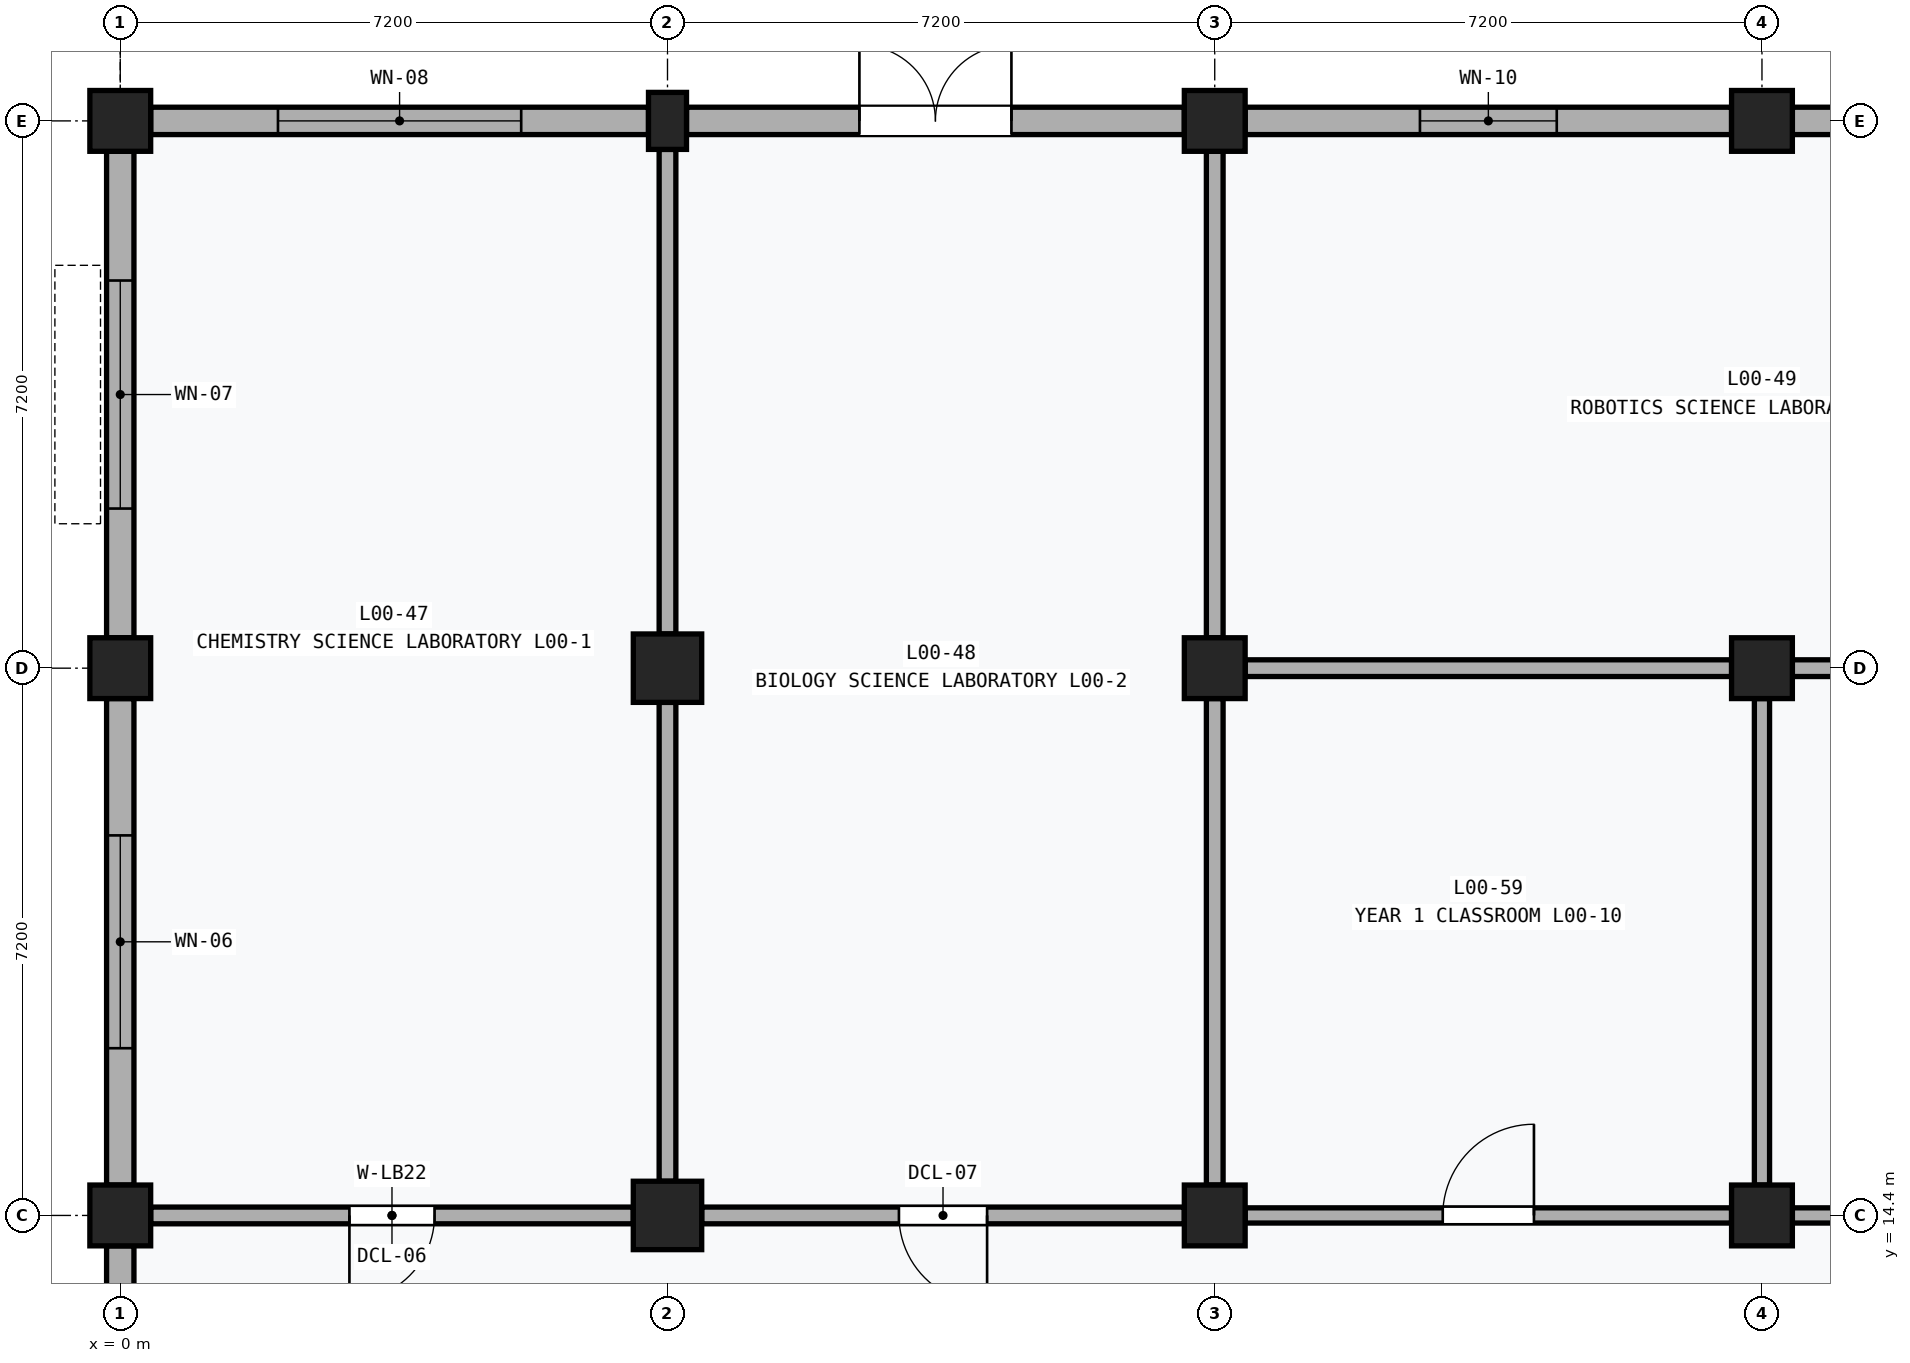
"""IFC4 building model, lengths in metres.
Left out: names, types, materials, properties, quantities, classifications, styles, units other than length and angle.
Written with IfcOpenShell. Run it as: python <this file> out.ifc"""

import sys

from ifc_helpers import new_model, si_unit, direction, frame, frame_2d, origin, origin_2d, place, context, subcontext, project, spatial, rectangle, extrude, element, fill, save


model = new_model("IFC4")
c1 = context("Model", 3, precision=1e-05, world=origin(), true_north=direction((0.0, 1.0)))
c2 = subcontext(c1, "Body", "Model", "MODEL_VIEW")
j1 = project(units=[si_unit("LENGTHUNIT", "METRE"), si_unit("PLANEANGLEUNIT", "RADIAN")], contexts=[c1])
p1 = place(None, origin())
s1 = spatial("IfcSite", under=j1, at=p1, CompositionType="ELEMENT")
p2 = place(p1, origin())
s2 = spatial("IfcBuilding", under=s1, at=p2, CompositionType="ELEMENT")
p3 = place(p2, origin())
s3 = spatial("IfcBuildingStorey", under=s2, at=p3, CompositionType="ELEMENT", Elevation=0.0)
for number, where, z_axis, x_axis in (
    (1, (0.0, 14.4, 0.0), (0.0, 0.0, 1.0), (1.0, 0.0, 0.0)),
    (2, (0.0, 21.6, 0.0), (0.0, 0.0, 1.0), (1.0, 0.0, 0.0)),
    (3, (0.0, 28.8, 0.0), (0.0, 0.0, 1.0), (1.0, 0.0, 0.0)),
):
    element("IfcColumn", number, at=place(p3, frame(where, z_axis=z_axis, x_axis=x_axis)), inside=s3, PredefinedType="COLUMN", context=c2, shape_type="SweptSolid", body=[
        extrude(rectangle(XDim=0.8, YDim=0.8, at=origin_2d()), origin(), (0.0, 0.0, 1.0), 4.8),
    ])
for number, where, z_axis, x_axis in (
    (4, (7.2, 14.4, 0.0), (0.0, 0.0, 1.0), (1.0, 0.0, 0.0)),
    (5, (7.2, 21.6, 0.0), (0.0, 0.0, 1.0), (1.0, 0.0, 0.0)),
):
    element("IfcColumn", number, at=place(p3, frame(where, z_axis=z_axis, x_axis=x_axis)), inside=s3, PredefinedType="COLUMN", context=c2, shape_type="SweptSolid", body=[
        extrude(rectangle(XDim=0.9, YDim=0.9, at=origin_2d()), origin(), (0.0, 0.0, 1.0), 4.8),
    ])
p4 = place(p3, frame((7.2, 28.8, 0.0), z_axis=(0.0, 0.0, 1.0), x_axis=(1.0, 0.0, 0.0)))
e6 = element("IfcColumn", 6, at=p4, inside=s3, PredefinedType="PILASTER", context=c2, shape_type="SweptSolid", body=[
    extrude(rectangle(XDim=0.5, YDim=0.75, at=origin_2d()), origin(), (0.0, 0.0, 1.0), 4.8),
])
for number, where, z_axis, x_axis in (
    (7, (14.4, 14.4, 0.0), (0.0, 0.0, 1.0), (1.0, 0.0, 0.0)),
    (8, (14.4, 21.6, 0.0), (0.0, 0.0, 1.0), (1.0, 0.0, 0.0)),
    (9, (14.4, 28.8, 0.0), (0.0, 0.0, 1.0), (1.0, 0.0, 0.0)),
    (10, (21.6, 14.4, 0.0), (0.0, 0.0, 1.0), (1.0, 0.0, 0.0)),
    (11, (21.6, 21.6, 0.0), (0.0, 0.0, 1.0), (1.0, 0.0, 0.0)),
    (12, (21.6, 28.8, 0.0), (0.0, 0.0, 1.0), (1.0, 0.0, 0.0)),
):
    element("IfcColumn", number, at=place(p3, frame(where, z_axis=z_axis, x_axis=x_axis)), inside=s3, PredefinedType="COLUMN", context=c2, shape_type="SweptSolid", body=[
        extrude(rectangle(XDim=0.8, YDim=0.8, at=origin_2d()), origin(), (0.0, 0.0, 1.0), 4.8),
    ])
p5 = place(p3, frame((0.0, 7.6, 0.0), z_axis=(0.0, 0.0, 1.0), x_axis=(0.0, 1.0, 0.0)))
e13 = element("IfcWall", 13, at=p5, inside=s3, PredefinedType="SOLIDWALL", context=c2, shape_type="SweptSolid", body=[
    extrude(rectangle(XDim=6.4, YDim=0.36, at=frame_2d((3.2, 0.0))), origin(), (0.0, 0.0, 1.0), 3.89),
])
p6 = place(p5, frame((1.9, 0.0, 0.9)))
e14 = element("IfcOpeningElement", 14, at=p6, cuts=e13, PredefinedType="OPENING", context=c2, shape_type="SweptSolid", body=[
    extrude(rectangle(XDim=2.6, YDim=1.8, at=frame_2d((1.3, 0.9))), frame((0.0, 0.192, 0.0), z_axis=(0.0, -1.0, 0.0), x_axis=(1.0, 0.0, 0.0)), (0.0, 0.0, 1.0), 0.384),
])
p7 = place(p3, frame((0.0, 14.8, 0.0), z_axis=(0.0, 0.0, 1.0), x_axis=(0.0, 1.0, 0.0)))
e15 = element("IfcWall", 15, at=p7, inside=s3, PredefinedType="SOLIDWALL", context=c2, shape_type="SweptSolid", body=[
    extrude(rectangle(XDim=6.4, YDim=0.36, at=frame_2d((3.2, 0.0))), origin(), (0.0, 0.0, 1.0), 3.89),
])
p8 = place(p7, frame((1.8, 0.0, 0.9)))
e16 = element("IfcOpeningElement", 16, at=p8, cuts=e15, PredefinedType="OPENING", context=c2, shape_type="SweptSolid", body=[
    extrude(rectangle(XDim=2.8, YDim=1.8, at=frame_2d((1.4, 0.9))), frame((0.0, 0.192, 0.0), z_axis=(0.0, -1.0, 0.0), x_axis=(1.0, 0.0, 0.0)), (0.0, 0.0, 1.0), 0.384),
])
p9 = place(p3, frame((0.4, 28.8, 0.0), z_axis=(0.0, 0.0, 1.0), x_axis=(1.0, 0.0, 0.0)))
e17 = element("IfcWall", 17, at=p9, inside=s3, PredefinedType="SOLIDWALL", context=c2, shape_type="SweptSolid", body=[
    extrude(rectangle(XDim=6.55, YDim=0.36, at=frame_2d((3.275, 0.0))), origin(), (0.0, 0.0, 1.0), 3.89),
])
p10 = place(p9, frame((1.675, 0.0, 0.9)))
e18 = element("IfcOpeningElement", 18, at=p10, cuts=e17, PredefinedType="OPENING", context=c2, shape_type="SweptSolid", body=[
    extrude(rectangle(XDim=3.2, YDim=1.8, at=frame_2d((1.6, 0.9))), frame((0.0, 0.192, 0.0), z_axis=(0.0, -1.0, 0.0), x_axis=(1.0, 0.0, 0.0)), (0.0, 0.0, 1.0), 0.384),
])
p11 = place(p3, frame((0.0, 22.0, 0.0), z_axis=(0.0, 0.0, 1.0), x_axis=(0.0, 1.0, 0.0)))
e19 = element("IfcWall", 19, at=p11, inside=s3, PredefinedType="SOLIDWALL", context=c2, shape_type="SweptSolid", body=[
    extrude(rectangle(XDim=6.4, YDim=0.36, at=frame_2d((3.2, 0.0))), origin(), (0.0, 0.0, 1.0), 3.89),
])
p12 = place(p11, frame((1.7, 0.0, 0.9)))
e20 = element("IfcOpeningElement", 20, at=p12, cuts=e19, PredefinedType="OPENING", context=c2, shape_type="SweptSolid", body=[
    extrude(rectangle(XDim=3.0, YDim=1.8, at=frame_2d((1.5, 0.9))), frame((0.0, 0.192, 0.0), z_axis=(0.0, -1.0, 0.0), x_axis=(1.0, 0.0, 0.0)), (0.0, 0.0, 1.0), 0.384),
])
p13 = place(p3, frame((7.45, 28.8, 0.0), z_axis=(0.0, 0.0, 1.0), x_axis=(1.0, 0.0, 0.0)))
e21 = element("IfcWall", 21, at=p13, inside=s3, PredefinedType="SOLIDWALL", context=c2, shape_type="SweptSolid", body=[
    extrude(rectangle(XDim=6.55, YDim=0.36, at=frame_2d((3.275, 0.0))), origin(), (0.0, 0.0, 1.0), 3.89),
])
p14 = place(p13, frame((2.275, 0.0, 0.0)))
e22 = element("IfcOpeningElement", 22, at=p14, cuts=e21, PredefinedType="OPENING", context=c2, shape_type="SweptSolid", body=[
    extrude(rectangle(XDim=2.0, YDim=2.4, at=frame_2d((1.0, 1.2))), frame((0.0, 0.192, 0.0), z_axis=(0.0, -1.0, 0.0), x_axis=(1.0, 0.0, 0.0)), (0.0, 0.0, 1.0), 0.384),
])
p15 = place(p3, frame((14.8, 28.8, 0.0), z_axis=(0.0, 0.0, 1.0), x_axis=(1.0, 0.0, 0.0)))
e23 = element("IfcWall", 23, at=p15, inside=s3, PredefinedType="SOLIDWALL", context=c2, shape_type="SweptSolid", body=[
    extrude(rectangle(XDim=6.4, YDim=0.36, at=frame_2d((3.2, 0.0))), origin(), (0.0, 0.0, 1.0), 3.89),
])
p16 = place(p15, frame((2.3, 0.0, 0.85)))
e24 = element("IfcOpeningElement", 24, at=p16, cuts=e23, PredefinedType="OPENING", context=c2, shape_type="SweptSolid", body=[
    extrude(rectangle(XDim=1.8, YDim=2.0, at=frame_2d((0.9, 1.0))), frame((0.0, 0.192, 0.0), z_axis=(0.0, -1.0, 0.0), x_axis=(1.0, 0.0, 0.0)), (0.0, 0.0, 1.0), 0.384),
])
p17 = place(p3, frame((22.0, 28.8, 0.0), z_axis=(0.0, 0.0, 1.0), x_axis=(1.0, 0.0, 0.0)))
e25 = element("IfcWall", 25, at=p17, inside=s3, PredefinedType="SOLIDWALL", context=c2, shape_type="SweptSolid", body=[
    extrude(rectangle(XDim=6.4, YDim=0.36, at=frame_2d((3.2, 0.0))), origin(), (0.0, 0.0, 1.0), 3.89),
])
p18 = place(p17, frame((2.15, 0.0, 0.85)))
e26 = element("IfcOpeningElement", 26, at=p18, cuts=e25, PredefinedType="OPENING", context=c2, shape_type="SweptSolid", body=[
    extrude(rectangle(XDim=2.1, YDim=2.0, at=frame_2d((1.05, 1.0))), frame((0.0, 0.192, 0.0), z_axis=(0.0, -1.0, 0.0), x_axis=(1.0, 0.0, 0.0)), (0.0, 0.0, 1.0), 0.384),
])
p19 = place(p3, frame((0.4, 14.4, 0.0), z_axis=(0.0, 0.0, 1.0), x_axis=(1.0, 0.0, 0.0)))
e27 = element("IfcWall", 27, at=p19, inside=s3, PredefinedType="PARTITIONING", context=c2, shape_type="SweptSolid", body=[
    extrude(rectangle(XDim=6.35, YDim=0.22, at=frame_2d((3.175, 0.0))), origin(), (0.0, 0.0, 1.0), 3.62),
])
p20 = place(p19, frame((2.615, 0.0, 0.0)))
e28 = element("IfcOpeningElement", 28, at=p20, cuts=e27, PredefinedType="OPENING", context=c2, shape_type="SweptSolid", body=[
    extrude(rectangle(XDim=1.12, YDim=2.2, at=frame_2d((0.56, 1.1))), frame((0.0, 0.122, 0.0), z_axis=(0.0, -1.0, 0.0), x_axis=(1.0, 0.0, 0.0)), (0.0, 0.0, 1.0), 0.244),
])
p21 = place(p3, frame((7.2, 14.85, 0.0), z_axis=(0.0, 0.0, 1.0), x_axis=(0.0, 1.0, 0.0)))
e29 = element("IfcWall", 29, at=p21, inside=s3, PredefinedType="PARTITIONING", context=c2, shape_type="SweptSolid", body=[
    extrude(rectangle(XDim=6.3, YDim=0.22, at=frame_2d((3.15, 0.0))), origin(), (0.0, 0.0, 1.0), 3.62),
])
p22 = place(p3, frame((7.2, 22.05, 0.0), z_axis=(0.0, 0.0, 1.0), x_axis=(0.0, 1.0, 0.0)))
e30 = element("IfcWall", 30, at=p22, inside=s3, PredefinedType="PARTITIONING", context=c2, shape_type="SweptSolid", body=[
    extrude(rectangle(XDim=6.375, YDim=0.22, at=frame_2d((3.188, 0.0))), origin(), (0.0, 0.0, 1.0), 3.62),
])
p23 = place(p3, frame((7.65, 14.4, 0.0), z_axis=(0.0, 0.0, 1.0), x_axis=(1.0, 0.0, 0.0)))
e31 = element("IfcWall", 31, at=p23, inside=s3, PredefinedType="PARTITIONING", context=c2, shape_type="SweptSolid", body=[
    extrude(rectangle(XDim=6.35, YDim=0.22, at=frame_2d((3.175, 0.0))), origin(), (0.0, 0.0, 1.0), 3.62),
])
p24 = place(p23, frame((2.595, 0.0, 0.0)))
e32 = element("IfcOpeningElement", 32, at=p24, cuts=e31, PredefinedType="OPENING", context=c2, shape_type="SweptSolid", body=[
    extrude(rectangle(XDim=1.16, YDim=2.22, at=frame_2d((0.58, 1.11))), frame((0.0, 0.122, 0.0), z_axis=(0.0, -1.0, 0.0), x_axis=(1.0, 0.0, 0.0)), (0.0, 0.0, 1.0), 0.244),
])
for number, where, z_axis, x_axis in (
    (33, (14.4, 14.8, 0.0), (0.0, 0.0, 1.0), (0.0, 1.0, 0.0)),
    (34, (14.4, 22.0, 0.0), (0.0, 0.0, 1.0), (0.0, 1.0, 0.0)),
    (35, (14.8, 21.6, 0.0), (0.0, 0.0, 1.0), (1.0, 0.0, 0.0)),
    (36, (22.0, 21.6, 0.0), (0.0, 0.0, 1.0), (1.0, 0.0, 0.0)),
):
    element("IfcWall", number, at=place(p3, frame(where, z_axis=z_axis, x_axis=x_axis)), inside=s3, PredefinedType="PARTITIONING", context=c2, shape_type="SweptSolid", body=[
        extrude(rectangle(XDim=6.4, YDim=0.22, at=frame_2d((3.2, 0.0))), origin(), (0.0, 0.0, 1.0), 3.62),
    ])
p25 = place(p3, frame((14.8, 14.4, 0.0), z_axis=(0.0, 0.0, 1.0), x_axis=(1.0, 0.0, 0.0)))
e37 = element("IfcWall", 37, at=p25, inside=s3, PredefinedType="PARTITIONING", context=c2, shape_type="SweptSolid", body=[
    extrude(rectangle(XDim=6.4, YDim=0.2, at=frame_2d((3.2, 0.0))), origin(), (0.0, 0.0, 1.0), 3.62),
])
p26 = place(p25, frame((2.6, 0.0, 0.0)))
e38 = element("IfcOpeningElement", 38, at=p26, cuts=e37, PredefinedType="OPENING", context=c2, shape_type="SweptSolid", body=[
    extrude(rectangle(XDim=1.2, YDim=2.24, at=frame_2d((0.6, 1.12))), frame((0.0, 0.112, 0.0), z_axis=(0.0, -1.0, 0.0), x_axis=(1.0, 0.0, 0.0)), (0.0, 0.0, 1.0), 0.224),
])
p27 = place(p3, frame((21.6, 14.8, 0.0), z_axis=(0.0, 0.0, 1.0), x_axis=(0.0, 1.0, 0.0)))
e39 = element("IfcWall", 39, at=p27, inside=s3, PredefinedType="PARTITIONING", context=c2, shape_type="SweptSolid", body=[
    extrude(rectangle(XDim=6.4, YDim=0.2, at=frame_2d((3.2, 0.0))), origin(), (0.0, 0.0, 1.0), 3.62),
])
p28 = place(p3, frame((22.0, 14.4, 0.0), z_axis=(0.0, 0.0, 1.0), x_axis=(1.0, 0.0, 0.0)))
e40 = element("IfcWall", 40, at=p28, inside=s3, PredefinedType="PARTITIONING", context=c2, shape_type="SweptSolid", body=[
    extrude(rectangle(XDim=6.4, YDim=0.2, at=frame_2d((3.2, 0.0))), origin(), (0.0, 0.0, 1.0), 3.62),
])
p29 = place(p28, frame((2.58, 0.0, 0.0)))
e41 = element("IfcOpeningElement", 41, at=p29, cuts=e40, PredefinedType="OPENING", context=c2, shape_type="SweptSolid", body=[
    extrude(rectangle(XDim=1.24, YDim=2.26, at=frame_2d((0.62, 1.13))), frame((0.0, 0.112, 0.0), z_axis=(0.0, -1.0, 0.0), x_axis=(1.0, 0.0, 0.0)), (0.0, 0.0, 1.0), 0.224),
])
p30 = place(p8, origin())
e42 = element("IfcWindow", 42, at=p30, inside=s3, PartitioningType="SINGLE_PANEL", PredefinedType="WINDOW", context=c2, shape_type="SweptSolid", body=[
    extrude(rectangle(XDim=2.8, YDim=1.8, at=frame_2d((1.4, 0.9))), frame((0.0, 0.03, 0.0), z_axis=(0.0, -1.0, 0.0), x_axis=(1.0, 0.0, 0.0)), (0.0, 0.0, 1.0), 0.06),
])
fill(e16, e42)
p31 = place(p10, origin())
e43 = element("IfcWindow", 43, at=p31, inside=s3, PartitioningType="SINGLE_PANEL", PredefinedType="WINDOW", context=c2, shape_type="SweptSolid", body=[
    extrude(rectangle(XDim=3.2, YDim=1.8, at=frame_2d((1.6, 0.9))), frame((0.0, 0.03, 0.0), z_axis=(0.0, -1.0, 0.0), x_axis=(1.0, 0.0, 0.0)), (0.0, 0.0, 1.0), 0.06),
])
fill(e18, e43)
p32 = place(p12, origin())
e44 = element("IfcWindow", 44, at=p32, inside=s3, PartitioningType="SINGLE_PANEL", PredefinedType="WINDOW", context=c2, shape_type="SweptSolid", body=[
    extrude(rectangle(XDim=3.0, YDim=1.8, at=frame_2d((1.5, 0.9))), frame((0.0, 0.03, 0.0), z_axis=(0.0, -1.0, 0.0), x_axis=(1.0, 0.0, 0.0)), (0.0, 0.0, 1.0), 0.06),
])
fill(e20, e44)
p33 = place(p14, origin())
e45 = element("IfcDoor", 45, at=p33, inside=s3, OperationType="DOUBLE_DOOR_SINGLE_SWING", PredefinedType="DOOR", context=c2, shape_type="SweptSolid", body=[
    extrude(rectangle(XDim=2.0, YDim=2.4, at=frame_2d((1.0, 1.2))), frame((0.0, 0.025, 0.0), z_axis=(0.0, -1.0, 0.0), x_axis=(1.0, 0.0, 0.0)), (0.0, 0.0, 1.0), 0.05),
])
fill(e22, e45)
p34 = place(p16, origin())
e46 = element("IfcWindow", 46, at=p34, inside=s3, PartitioningType="SINGLE_PANEL", PredefinedType="WINDOW", context=c2, shape_type="SweptSolid", body=[
    extrude(rectangle(XDim=1.8, YDim=2.0, at=frame_2d((0.9, 1.0))), frame((0.0, 0.03, 0.0), z_axis=(0.0, -1.0, 0.0), x_axis=(1.0, 0.0, 0.0)), (0.0, 0.0, 1.0), 0.06),
])
fill(e24, e46)
p35 = place(p20, frame((1.12, 0.0, 0.0), z_axis=(0.0, 0.0, 1.0), x_axis=(-1.0, 0.0, 0.0)))
e47 = element("IfcDoor", 47, at=p35, inside=s3, OperationType="SINGLE_SWING_RIGHT", PredefinedType="DOOR", context=c2, shape_type="SweptSolid", body=[
    extrude(rectangle(XDim=1.12, YDim=2.2, at=frame_2d((0.56, 1.1))), frame((0.0, 0.025, 0.0), z_axis=(0.0, -1.0, 0.0), x_axis=(1.0, 0.0, 0.0)), (0.0, 0.0, 1.0), 0.05),
])
fill(e28, e47)
p36 = place(p24, frame((1.16, 0.0, 0.0), z_axis=(0.0, 0.0, 1.0), x_axis=(-1.0, 0.0, 0.0)))
e48 = element("IfcDoor", 48, at=p36, inside=s3, OperationType="SINGLE_SWING_LEFT", PredefinedType="DOOR", context=c2, shape_type="SweptSolid", body=[
    extrude(rectangle(XDim=1.16, YDim=2.22, at=frame_2d((0.58, 1.11))), frame((0.0, 0.025, 0.0), z_axis=(0.0, -1.0, 0.0), x_axis=(1.0, 0.0, 0.0)), (0.0, 0.0, 1.0), 0.05),
])
fill(e32, e48)
p37 = place(p26, origin())
e49 = element("IfcDoor", 49, at=p37, inside=s3, OperationType="SINGLE_SWING_RIGHT", PredefinedType="DOOR", context=c2, shape_type="SweptSolid", body=[
    extrude(rectangle(XDim=1.2, YDim=2.24, at=frame_2d((0.6, 1.12))), frame((0.0, 0.025, 0.0), z_axis=(0.0, -1.0, 0.0), x_axis=(1.0, 0.0, 0.0)), (0.0, 0.0, 1.0), 0.05),
])
fill(e38, e49)
save(model, sys.argv[1])
